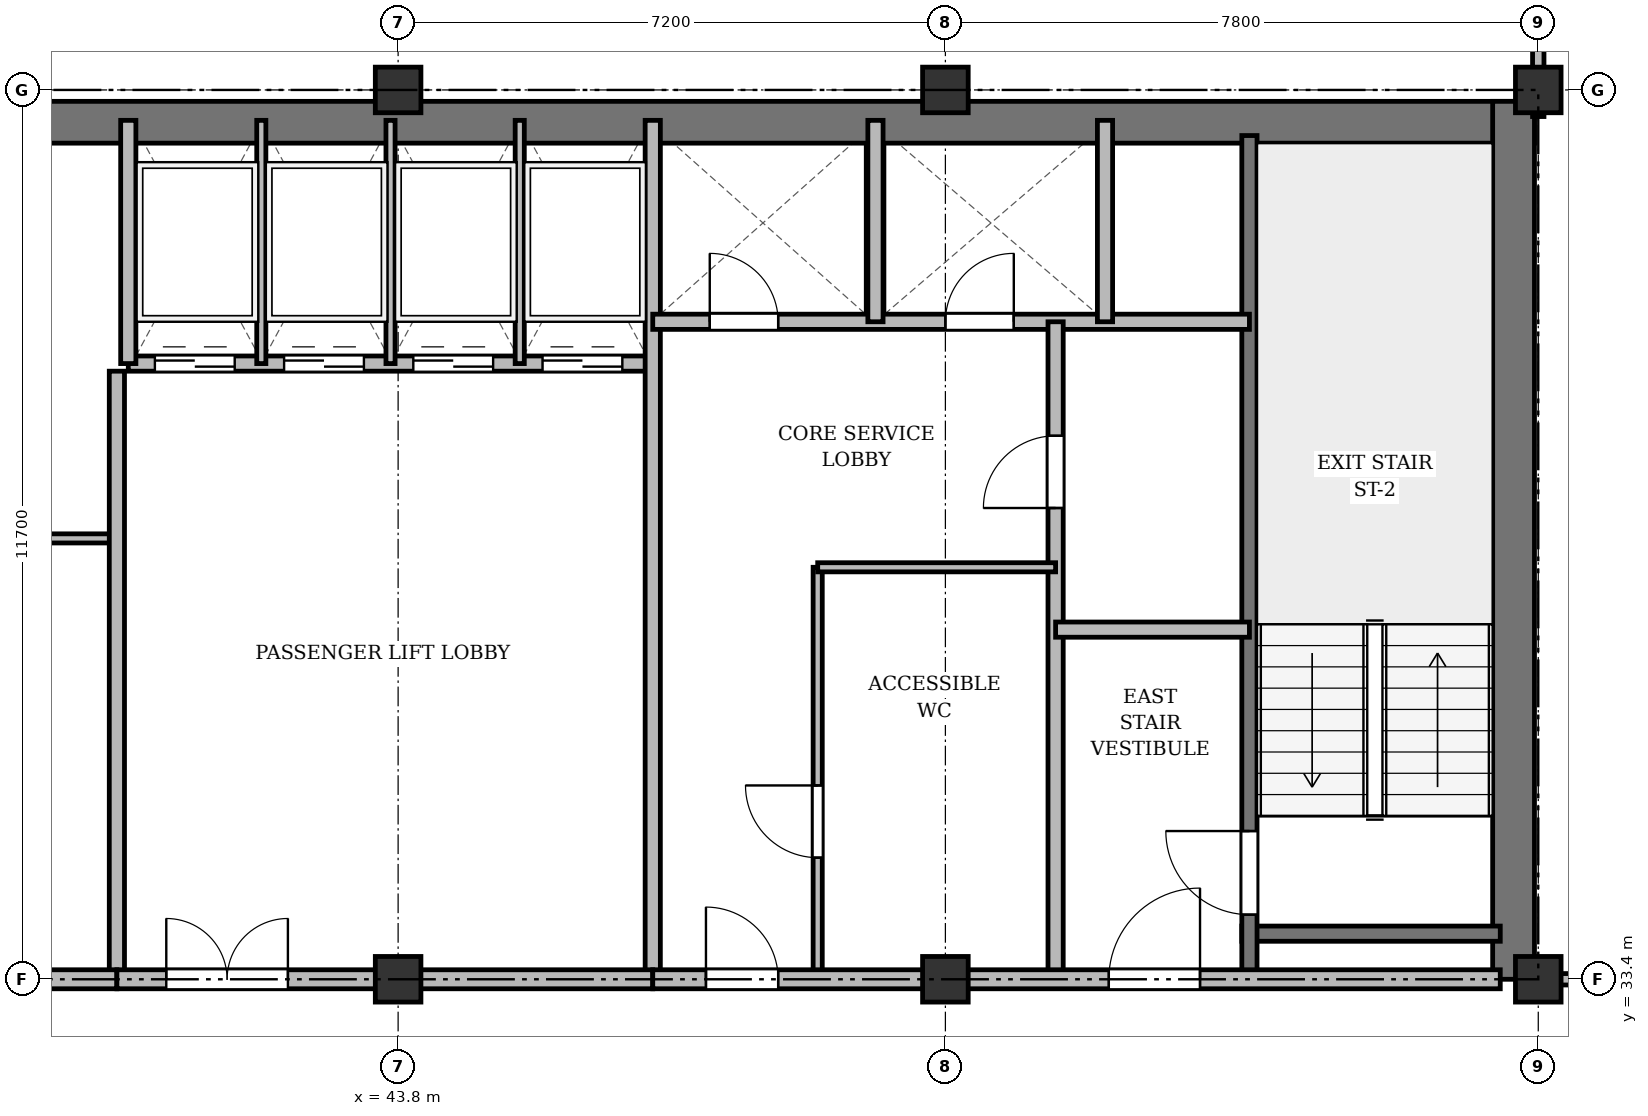
"""IFC4 building model, lengths in metres.
Left out: names, types, materials, properties, quantities, classifications, styles, units other than length and angle.
Written with IfcOpenShell. Run it as: python <this file> out.ifc"""

import sys

from ifc_helpers import new_model, si_unit, direction, frame, frame_2d, origin, origin_2d, place, context, subcontext, project, spatial, rectangle, extrude, source, transform, mapped, element, fill, save


model = new_model("IFC4")
c1 = context("Model", 3, precision=1e-05, world=origin(), true_north=direction((0.0, 1.0)))
c2 = subcontext(c1, "Body", "Model", "MODEL_VIEW")
j1 = project(units=[si_unit("LENGTHUNIT", "METRE"), si_unit("PLANEANGLEUNIT", "RADIAN")], contexts=[c1])
p1 = place(None, origin())
s1 = spatial("IfcSite", under=j1, at=p1, CompositionType="ELEMENT")
p2 = place(p1, origin())
s2 = spatial("IfcBuilding", under=s1, at=p2, CompositionType="ELEMENT")
p3 = place(p2, frame((0.0, 0.0, 252.3)))
s3 = spatial("IfcBuildingStorey", under=s2, at=p3, CompositionType="ELEMENT", Elevation=252.3)
m1 = source(origin(), c2, "Body", "SweptSolid", [
    extrude(rectangle(XDim=0.6, YDim=0.6, at=origin_2d()), origin(), (0.0, 0.0, 1.0), 3.6),
])
for number, where, z_axis, x_axis in (
    (1, (43.8, 33.4, 0.0), (0.0, 0.0, 1.0), (1.0, 0.0, 0.0)),
    (2, (43.8, 45.1, 0.0), (0.0, 0.0, 1.0), (1.0, 0.0, 0.0)),
    (3, (51.0, 33.4, 0.0), (0.0, 0.0, 1.0), (1.0, 0.0, 0.0)),
    (4, (51.0, 45.1, 0.0), (0.0, 0.0, 1.0), (1.0, 0.0, 0.0)),
    (5, (58.8, 33.4, 0.0), (0.0, 0.0, 1.0), (1.0, 0.0, 0.0)),
    (6, (58.8, 45.1, 0.0), (0.0, 0.0, 1.0), (1.0, 0.0, 0.0)),
):
    element("IfcColumn", number, at=place(p3, frame(where, z_axis=z_axis, x_axis=x_axis)), inside=s3, PredefinedType="COLUMN", context=c2, shape_type="MappedRepresentation", body=[
        mapped(m1, transform((0.0, 0.0, 0.0), x_axis=(1.0, 0.0, 0.0), y_axis=(0.0, 1.0, 0.0), z_axis=(0.0, 0.0, 1.0), scale=1.0)),
    ])
p4 = place(p3, frame((15.65, 44.675, 0.0), z_axis=(0.0, 0.0, 1.0), x_axis=(1.0, 0.0, 0.0)))
e7 = element("IfcWall", 7, at=p4, inside=s3, PredefinedType="SHEAR", context=c2, shape_type="SweptSolid", body=[
    extrude(rectangle(XDim=43.1, YDim=0.55, at=frame_2d((21.55, 0.0))), origin(), (0.0, 0.0, 1.0), 3.37),
])
p5 = place(p3, frame((58.475, 33.4, 0.0), z_axis=(0.0, 0.0, 1.0), x_axis=(0.0, 1.0, 0.0)))
e8 = element("IfcWall", 8, at=p5, inside=s3, PredefinedType="SHEAR", context=c2, shape_type="SweptSolid", body=[
    extrude(rectangle(XDim=11.55, YDim=0.55, at=frame_2d((5.775, 0.0))), origin(), (0.0, 0.0, 1.0), 3.37),
])
p6 = place(p3, frame((54.9, 34.0, 0.0), z_axis=(0.0, 0.0, 1.0), x_axis=(1.0, 0.0, 0.0)))
e9 = element("IfcWall", 9, at=p6, inside=s3, PredefinedType="SHEAR", context=c2, shape_type="SweptSolid", body=[
    extrude(rectangle(XDim=3.4, YDim=0.2, at=frame_2d((1.7, 0.0))), origin(), (0.0, 0.0, 1.0), 3.37),
])
p7 = place(p3, frame((55.0, 33.4, 0.0), z_axis=(0.0, 0.0, 1.0), x_axis=(0.0, 1.0, 0.0)))
e10 = element("IfcWall", 10, at=p7, inside=s3, PredefinedType="SHEAR", context=c2, shape_type="SweptSolid", body=[
    extrude(rectangle(XDim=11.1, YDim=0.2, at=frame_2d((5.55, 0.0))), origin(), (0.0, 0.0, 1.0), 3.37),
])
p8 = place(p7, frame((0.85, 0.0, 0.0)))
e11 = element("IfcOpeningElement", 11, at=p8, cuts=e10, PredefinedType="OPENING", context=c2, shape_type="SweptSolid", body=[
    extrude(rectangle(XDim=1.1, YDim=2.15, at=frame_2d((0.55, 1.075))), frame((0.0, 0.11, 0.0), z_axis=(0.0, -1.0, 0.0), x_axis=(1.0, 0.0, 0.0)), (0.0, 0.0, 1.0), 0.22),
])
p9 = place(p3, frame((33.3, 39.2, 0.0), z_axis=(0.0, 0.0, 1.0), x_axis=(1.0, 0.0, 0.0)))
e12 = element("IfcWall", 12, at=p9, inside=s3, PredefinedType="PARTITIONING", context=c2, shape_type="SweptSolid", body=[
    extrude(rectangle(XDim=6.8, YDim=0.12, at=frame_2d((3.4, 0.0))), origin(), (0.0, 0.0, 1.0), 3.37),
])
p10 = place(p9, frame((2.6, 0.0, 0.0)))
e13 = element("IfcOpeningElement", 13, at=p10, cuts=e12, PredefinedType="OPENING", context=c2, shape_type="SweptSolid", body=[
    extrude(rectangle(XDim=0.95, YDim=2.15, at=frame_2d((0.475, 1.075))), frame((0.0, 0.07, 0.0), z_axis=(0.0, -1.0, 0.0), x_axis=(1.0, 0.0, 0.0)), (0.0, 0.0, 1.0), 0.14),
])
p11 = place(p3, frame((40.1, 33.4, 0.0), z_axis=(0.0, 0.0, 1.0), x_axis=(0.0, 1.0, 0.0)))
e14 = element("IfcWall", 14, at=p11, inside=s3, PredefinedType="SOLIDWALL", context=c2, shape_type="SweptSolid", body=[
    extrude(rectangle(XDim=8.0, YDim=0.2, at=frame_2d((4.0, 0.0))), origin(), (0.0, 0.0, 1.0), 2.92),
])
p12 = place(p3, frame((40.25, 41.5, 0.0), z_axis=(0.0, 0.0, 1.0), x_axis=(1.0, 0.0, 0.0)))
e15 = element("IfcWall", 15, at=p12, inside=s3, PredefinedType="SOLIDWALL", context=c2, shape_type="SweptSolid", body=[
    extrude(rectangle(XDim=6.9, YDim=0.2, at=frame_2d((3.45, 0.0))), origin(), (0.0, 0.0, 1.0), 3.37),
])
p13 = place(p12, frame((0.35, 0.0, 0.0)))
e16 = element("IfcOpeningElement", 16, at=p13, cuts=e15, PredefinedType="OPENING", context=c2, shape_type="SweptSolid", body=[
    extrude(rectangle(XDim=1.05, YDim=2.15, at=frame_2d((0.525, 1.075))), frame((0.0, 0.11, 0.0), z_axis=(0.0, -1.0, 0.0), x_axis=(1.0, 0.0, 0.0)), (0.0, 0.0, 1.0), 0.22),
])
p14 = place(p12, frame((2.05, 0.0, 0.0)))
e17 = element("IfcOpeningElement", 17, at=p14, cuts=e15, PredefinedType="OPENING", context=c2, shape_type="SweptSolid", body=[
    extrude(rectangle(XDim=1.05, YDim=2.15, at=frame_2d((0.525, 1.075))), frame((0.0, 0.11, 0.0), z_axis=(0.0, -1.0, 0.0), x_axis=(1.0, 0.0, 0.0)), (0.0, 0.0, 1.0), 0.22),
])
p15 = place(p12, frame((3.75, 0.0, 0.0)))
e18 = element("IfcOpeningElement", 18, at=p15, cuts=e15, PredefinedType="OPENING", context=c2, shape_type="SweptSolid", body=[
    extrude(rectangle(XDim=1.05, YDim=2.15, at=frame_2d((0.525, 1.075))), frame((0.0, 0.11, 0.0), z_axis=(0.0, -1.0, 0.0), x_axis=(1.0, 0.0, 0.0)), (0.0, 0.0, 1.0), 0.22),
])
p16 = place(p12, frame((5.45, 0.0, 0.0)))
e19 = element("IfcOpeningElement", 19, at=p16, cuts=e15, PredefinedType="OPENING", context=c2, shape_type="SweptSolid", body=[
    extrude(rectangle(XDim=1.05, YDim=2.15, at=frame_2d((0.525, 1.075))), frame((0.0, 0.11, 0.0), z_axis=(0.0, -1.0, 0.0), x_axis=(1.0, 0.0, 0.0)), (0.0, 0.0, 1.0), 0.22),
])
p17 = place(p3, frame((40.25, 41.5, 0.0), z_axis=(0.0, 0.0, 1.0), x_axis=(0.0, 1.0, 0.0)))
e20 = element("IfcWall", 20, at=p17, inside=s3, PredefinedType="SOLIDWALL", context=c2, shape_type="SweptSolid", body=[
    extrude(rectangle(XDim=3.2, YDim=0.2, at=frame_2d((1.6, 0.0))), origin(), (0.0, 0.0, 1.0), 3.37),
])
for number, where, z_axis, x_axis in (
    (21, (42.0, 41.5, 0.0), (0.0, 0.0, 1.0), (0.0, 1.0, 0.0)),
    (22, (43.7, 41.5, 0.0), (0.0, 0.0, 1.0), (0.0, 1.0, 0.0)),
    (23, (45.4, 41.5, 0.0), (0.0, 0.0, 1.0), (0.0, 1.0, 0.0)),
):
    element("IfcWall", number, at=place(p3, frame(where, z_axis=z_axis, x_axis=x_axis)), inside=s3, PredefinedType="PARTITIONING", context=c2, shape_type="SweptSolid", body=[
        extrude(rectangle(XDim=3.2, YDim=0.12, at=frame_2d((1.6, 0.0))), origin(), (0.0, 0.0, 1.0), 3.37),
    ])
p18 = place(p3, frame((47.15, 33.4, 0.0), z_axis=(0.0, 0.0, 1.0), x_axis=(0.0, 1.0, 0.0)))
e24 = element("IfcWall", 24, at=p18, inside=s3, PredefinedType="SOLIDWALL", context=c2, shape_type="SweptSolid", body=[
    extrude(rectangle(XDim=11.3, YDim=0.2, at=frame_2d((5.65, 0.0))), origin(), (0.0, 0.0, 1.0), 2.92),
])
p19 = place(p3, frame((33.3, 33.4, 0.0), z_axis=(0.0, 0.0, 1.0), x_axis=(1.0, 0.0, 0.0)))
e25 = element("IfcWall", 25, at=p19, inside=s3, PredefinedType="PARTITIONING", context=c2, shape_type="SweptSolid", body=[
    extrude(rectangle(XDim=6.8, YDim=0.25, at=frame_2d((3.4, 0.0))), origin(), (0.0, 0.0, 1.0), 2.92),
])
p20 = place(p19, frame((2.4, 0.0, 0.0)))
e26 = element("IfcOpeningElement", 26, at=p20, cuts=e25, PredefinedType="OPENING", context=c2, shape_type="SweptSolid", body=[
    extrude(rectangle(XDim=1.0, YDim=2.15, at=frame_2d((0.5, 1.075))), frame((0.0, 0.135, 0.0), z_axis=(0.0, -1.0, 0.0), x_axis=(1.0, 0.0, 0.0)), (0.0, 0.0, 1.0), 0.27),
])
p21 = place(p3, frame((40.1, 33.4, 0.0), z_axis=(0.0, 0.0, 1.0), x_axis=(1.0, 0.0, 0.0)))
e27 = element("IfcWall", 27, at=p21, inside=s3, PredefinedType="PARTITIONING", context=c2, shape_type="SweptSolid", body=[
    extrude(rectangle(XDim=7.05, YDim=0.25, at=frame_2d((3.525, 0.0))), origin(), (0.0, 0.0, 1.0), 2.92),
])
p22 = place(p21, frame((0.65, 0.0, 0.0)))
e28 = element("IfcOpeningElement", 28, at=p22, cuts=e27, PredefinedType="OPENING", context=c2, shape_type="SweptSolid", body=[
    extrude(rectangle(XDim=1.6, YDim=2.2, at=frame_2d((0.8, 1.1))), frame((0.0, 0.135, 0.0), z_axis=(0.0, -1.0, 0.0), x_axis=(1.0, 0.0, 0.0)), (0.0, 0.0, 1.0), 0.27),
])
p23 = place(p3, frame((47.15, 42.05, 0.0), z_axis=(0.0, 0.0, 1.0), x_axis=(1.0, 0.0, 0.0)))
e29 = element("IfcWall", 29, at=p23, inside=s3, PredefinedType="SOLIDWALL", context=c2, shape_type="SweptSolid", body=[
    extrude(rectangle(XDim=7.85, YDim=0.2, at=frame_2d((3.925, 0.0))), origin(), (0.0, 0.0, 1.0), 2.87),
])
p24 = place(p23, frame((0.75, 0.0, 0.0)))
e30 = element("IfcOpeningElement", 30, at=p24, cuts=e29, PredefinedType="OPENING", context=c2, shape_type="SweptSolid", body=[
    extrude(rectangle(XDim=0.9, YDim=2.1, at=frame_2d((0.45, 1.05))), frame((0.0, 0.11, 0.0), z_axis=(0.0, -1.0, 0.0), x_axis=(1.0, 0.0, 0.0)), (0.0, 0.0, 1.0), 0.22),
])
p25 = place(p23, frame((3.85, 0.0, 0.0)))
e31 = element("IfcOpeningElement", 31, at=p25, cuts=e29, PredefinedType="OPENING", context=c2, shape_type="SweptSolid", body=[
    extrude(rectangle(XDim=0.9, YDim=2.1, at=frame_2d((0.45, 1.05))), frame((0.0, 0.11, 0.0), z_axis=(0.0, -1.0, 0.0), x_axis=(1.0, 0.0, 0.0)), (0.0, 0.0, 1.0), 0.22),
])
for number, where, z_axis, x_axis in (
    (32, (50.08, 42.05, 0.0), (0.0, 0.0, 1.0), (0.0, 1.0, 0.0)),
    (33, (53.1, 42.05, 0.0), (0.0, 0.0, 1.0), (0.0, 1.0, 0.0)),
):
    element("IfcWall", number, at=place(p3, frame(where, z_axis=z_axis, x_axis=x_axis)), inside=s3, PredefinedType="SOLIDWALL", context=c2, shape_type="SweptSolid", body=[
        extrude(rectangle(XDim=2.65, YDim=0.2, at=frame_2d((1.325, 0.0))), origin(), (0.0, 0.0, 1.0), 3.37),
    ])
p26 = place(p3, frame((52.45, 33.4, 0.0), z_axis=(0.0, 0.0, 1.0), x_axis=(0.0, 1.0, 0.0)))
e34 = element("IfcWall", 34, at=p26, inside=s3, PredefinedType="PARTITIONING", context=c2, shape_type="SweptSolid", body=[
    extrude(rectangle(XDim=8.65, YDim=0.2, at=frame_2d((4.325, 0.0))), origin(), (0.0, 0.0, 1.0), 2.92),
])
p27 = place(p26, frame((6.2, 0.0, 0.0)))
e35 = element("IfcOpeningElement", 35, at=p27, cuts=e34, PredefinedType="OPENING", context=c2, shape_type="SweptSolid", body=[
    extrude(rectangle(XDim=0.95, YDim=2.15, at=frame_2d((0.475, 1.075))), frame((0.0, 0.11, 0.0), z_axis=(0.0, -1.0, 0.0), x_axis=(1.0, 0.0, 0.0)), (0.0, 0.0, 1.0), 0.22),
])
p28 = place(p3, frame((52.45, 38.0, 0.0), z_axis=(0.0, 0.0, 1.0), x_axis=(1.0, 0.0, 0.0)))
e36 = element("IfcWall", 36, at=p28, inside=s3, PredefinedType="PARTITIONING", context=c2, shape_type="SweptSolid", body=[
    extrude(rectangle(XDim=2.55, YDim=0.2, at=frame_2d((1.275, 0.0))), origin(), (0.0, 0.0, 1.0), 3.37),
])
p29 = place(p3, frame((49.32, 33.4, 0.0), z_axis=(0.0, 0.0, 1.0), x_axis=(0.0, 1.0, 0.0)))
e37 = element("IfcWall", 37, at=p29, inside=s3, PredefinedType="PARTITIONING", context=c2, shape_type="SweptSolid", body=[
    extrude(rectangle(XDim=5.42, YDim=0.12, at=frame_2d((2.71, 0.0))), origin(), (0.0, 0.0, 1.0), 2.92),
])
p30 = place(p29, frame((1.6, 0.0, 0.0)))
e38 = element("IfcOpeningElement", 38, at=p30, cuts=e37, PredefinedType="OPENING", context=c2, shape_type="SweptSolid", body=[
    extrude(rectangle(XDim=0.95, YDim=2.15, at=frame_2d((0.475, 1.075))), frame((0.0, 0.07, 0.0), z_axis=(0.0, -1.0, 0.0), x_axis=(1.0, 0.0, 0.0)), (0.0, 0.0, 1.0), 0.14),
])
p31 = place(p3, frame((49.32, 38.82, 0.0), z_axis=(0.0, 0.0, 1.0), x_axis=(1.0, 0.0, 0.0)))
e39 = element("IfcWall", 39, at=p31, inside=s3, PredefinedType="PARTITIONING", context=c2, shape_type="SweptSolid", body=[
    extrude(rectangle(XDim=3.13, YDim=0.12, at=frame_2d((1.565, 0.0))), origin(), (0.0, 0.0, 1.0), 2.87),
])
p32 = place(p3, frame((47.15, 33.4, 0.0), z_axis=(0.0, 0.0, 1.0), x_axis=(1.0, 0.0, 0.0)))
e40 = element("IfcWall", 40, at=p32, inside=s3, PredefinedType="PARTITIONING", context=c2, shape_type="SweptSolid", body=[
    extrude(rectangle(XDim=11.15, YDim=0.25, at=frame_2d((5.575, 0.0))), origin(), (0.0, 0.0, 1.0), 2.92),
])
p33 = place(p32, frame((0.7, 0.0, 0.0)))
e41 = element("IfcOpeningElement", 41, at=p33, cuts=e40, PredefinedType="OPENING", context=c2, shape_type="SweptSolid", body=[
    extrude(rectangle(XDim=0.95, YDim=2.15, at=frame_2d((0.475, 1.075))), frame((0.0, 0.135, 0.0), z_axis=(0.0, -1.0, 0.0), x_axis=(1.0, 0.0, 0.0)), (0.0, 0.0, 1.0), 0.27),
])
p34 = place(p32, frame((6.0, 0.0, 0.0)))
e42 = element("IfcOpeningElement", 42, at=p34, cuts=e40, PredefinedType="OPENING", context=c2, shape_type="SweptSolid", body=[
    extrude(rectangle(XDim=1.2, YDim=2.15, at=frame_2d((0.6, 1.075))), frame((0.0, 0.135, 0.0), z_axis=(0.0, -1.0, 0.0), x_axis=(1.0, 0.0, 0.0)), (0.0, 0.0, 1.0), 0.27),
])
p35 = place(p3, frame((58.8, 33.4, 0.0), z_axis=(0.0, 0.0, 1.0), x_axis=(1.0, 0.0, 0.0)))
e43 = element("IfcWall", 43, at=p35, inside=s3, PredefinedType="PARTITIONING", context=c2, shape_type="SweptSolid", body=[
    extrude(rectangle(XDim=7.15, YDim=0.15, at=frame_2d((3.575, 0.0))), origin(), (0.0, 0.0, 1.0), 2.92),
])
p36 = place(p35, frame((3.0, 0.0, 0.0)))
e44 = element("IfcOpeningElement", 44, at=p36, cuts=e43, PredefinedType="OPENING", context=c2, shape_type="SweptSolid", body=[
    extrude(rectangle(XDim=0.95, YDim=2.15, at=frame_2d((0.475, 1.075))), frame((0.0, 0.085, 0.0), z_axis=(0.0, -1.0, 0.0), x_axis=(1.0, 0.0, 0.0)), (0.0, 0.0, 1.0), 0.17),
])
p37 = place(p3, frame((58.8, 44.75, 0.0), z_axis=(0.0, 0.0, 1.0), x_axis=(0.0, 1.0, 0.0)))
e45 = element("IfcWall", 45, at=p37, inside=s3, PredefinedType="PARTITIONING", context=c2, shape_type="SweptSolid", body=[
    extrude(rectangle(XDim=3.61, YDim=0.15, at=frame_2d((1.805, 0.0))), origin(), (0.0, 0.0, 1.0), 2.87),
])
p38 = place(p37, frame((1.1, 0.0, 0.0)))
e46 = element("IfcOpeningElement", 46, at=p38, cuts=e45, PredefinedType="OPENING", context=c2, shape_type="SweptSolid", body=[
    extrude(rectangle(XDim=0.95, YDim=2.15, at=frame_2d((0.475, 1.075))), frame((0.0, 0.085, 0.0), z_axis=(0.0, -1.0, 0.0), x_axis=(1.0, 0.0, 0.0)), (0.0, 0.0, 1.0), 0.17),
])
m2 = source(origin(), c2, "Body", "SweptSolid", [
    extrude(rectangle(XDim=1.1, YDim=2.15, at=frame_2d((0.55, 1.075))), frame((0.0, 0.025, 0.0), z_axis=(0.0, -1.0, 0.0), x_axis=(1.0, 0.0, 0.0)), (0.0, 0.0, 1.0), 0.05),
])
p39 = place(p8, origin())
e47 = element("IfcDoor", 47, at=p39, inside=s3, OperationType="SINGLE_SWING_RIGHT", PredefinedType="DOOR", context=c2, shape_type="MappedRepresentation", body=[
    mapped(m2, transform((0.0, 0.0, 0.0), x_axis=(1.0, 0.0, 0.0), y_axis=(0.0, 1.0, 0.0), z_axis=(0.0, 0.0, 1.0), scale=1.0)),
])
fill(e11, e47)
m3 = source(origin(), c2, "Body", "SweptSolid", [
    extrude(rectangle(XDim=1.05, YDim=2.15, at=frame_2d((0.525, 1.075))), frame((0.0, 0.025, 0.0), z_axis=(0.0, -1.0, 0.0), x_axis=(1.0, 0.0, 0.0)), (0.0, 0.0, 1.0), 0.05),
])
p40 = place(p13, origin())
e48 = element("IfcDoor", 48, at=p40, inside=s3, OperationType="DOUBLE_DOOR_SLIDING", PredefinedType="DOOR", context=c2, shape_type="MappedRepresentation", body=[
    mapped(m3, transform((0.0, 0.0, 0.0), x_axis=(1.0, 0.0, 0.0), y_axis=(0.0, 1.0, 0.0), z_axis=(0.0, 0.0, 1.0), scale=1.0)),
])
fill(e16, e48)
p41 = place(p14, origin())
e49 = element("IfcDoor", 49, at=p41, inside=s3, OperationType="DOUBLE_DOOR_SLIDING", PredefinedType="DOOR", context=c2, shape_type="MappedRepresentation", body=[
    mapped(m3, transform((0.0, 0.0, 0.0), x_axis=(1.0, 0.0, 0.0), y_axis=(0.0, 1.0, 0.0), z_axis=(0.0, 0.0, 1.0), scale=1.0)),
])
fill(e17, e49)
p42 = place(p15, origin())
e50 = element("IfcDoor", 50, at=p42, inside=s3, OperationType="DOUBLE_DOOR_SLIDING", PredefinedType="DOOR", context=c2, shape_type="MappedRepresentation", body=[
    mapped(m3, transform((0.0, 0.0, 0.0), x_axis=(1.0, 0.0, 0.0), y_axis=(0.0, 1.0, 0.0), z_axis=(0.0, 0.0, 1.0), scale=1.0)),
])
fill(e18, e50)
p43 = place(p16, origin())
e51 = element("IfcDoor", 51, at=p43, inside=s3, OperationType="DOUBLE_DOOR_SLIDING", PredefinedType="DOOR", context=c2, shape_type="MappedRepresentation", body=[
    mapped(m3, transform((0.0, 0.0, 0.0), x_axis=(1.0, 0.0, 0.0), y_axis=(0.0, 1.0, 0.0), z_axis=(0.0, 0.0, 1.0), scale=1.0)),
])
fill(e19, e51)
m4 = source(origin(), c2, "Body", "SweptSolid", [
    extrude(rectangle(XDim=1.6, YDim=2.2, at=frame_2d((0.8, 1.1))), frame((0.0, 0.025, 0.0), z_axis=(0.0, -1.0, 0.0), x_axis=(1.0, 0.0, 0.0)), (0.0, 0.0, 1.0), 0.05),
])
p44 = place(p22, origin())
e52 = element("IfcDoor", 52, at=p44, inside=s3, OperationType="DOUBLE_DOOR_SINGLE_SWING", PredefinedType="DOOR", context=c2, shape_type="MappedRepresentation", body=[
    mapped(m4, transform((0.0, 0.0, 0.0), x_axis=(1.0, 0.0, 0.0), y_axis=(0.0, 1.0, 0.0), z_axis=(0.0, 0.0, 1.0), scale=1.0)),
])
fill(e28, e52)
m5 = source(origin(), c2, "Body", "SweptSolid", [
    extrude(rectangle(XDim=0.9, YDim=2.1, at=frame_2d((0.45, 1.05))), frame((0.0, 0.025, 0.0), z_axis=(0.0, -1.0, 0.0), x_axis=(1.0, 0.0, 0.0)), (0.0, 0.0, 1.0), 0.05),
])
p45 = place(p24, origin())
e53 = element("IfcDoor", 53, at=p45, inside=s3, OperationType="SINGLE_SWING_LEFT", PredefinedType="DOOR", context=c2, shape_type="MappedRepresentation", body=[
    mapped(m5, transform((0.0, 0.0, 0.0), x_axis=(1.0, 0.0, 0.0), y_axis=(0.0, 1.0, 0.0), z_axis=(0.0, 0.0, 1.0), scale=1.0)),
])
fill(e30, e53)
p46 = place(p25, origin())
e54 = element("IfcDoor", 54, at=p46, inside=s3, OperationType="SINGLE_SWING_RIGHT", PredefinedType="DOOR", context=c2, shape_type="MappedRepresentation", body=[
    mapped(m5, transform((0.0, 0.0, 0.0), x_axis=(1.0, 0.0, 0.0), y_axis=(0.0, 1.0, 0.0), z_axis=(0.0, 0.0, 1.0), scale=1.0)),
])
fill(e31, e54)
m6 = source(origin(), c2, "Body", "SweptSolid", [
    extrude(rectangle(XDim=0.95, YDim=2.15, at=frame_2d((0.475, 1.075))), frame((0.0, 0.025, 0.0), z_axis=(0.0, -1.0, 0.0), x_axis=(1.0, 0.0, 0.0)), (0.0, 0.0, 1.0), 0.05),
])
p47 = place(p27, origin())
e55 = element("IfcDoor", 55, at=p47, inside=s3, OperationType="SINGLE_SWING_LEFT", PredefinedType="DOOR", context=c2, shape_type="MappedRepresentation", body=[
    mapped(m6, transform((0.0, 0.0, 0.0), x_axis=(1.0, 0.0, 0.0), y_axis=(0.0, 1.0, 0.0), z_axis=(0.0, 0.0, 1.0), scale=1.0)),
])
fill(e35, e55)
p48 = place(p30, origin())
e56 = element("IfcDoor", 56, at=p48, inside=s3, OperationType="SINGLE_SWING_RIGHT", PredefinedType="DOOR", context=c2, shape_type="MappedRepresentation", body=[
    mapped(m6, transform((0.0, 0.0, 0.0), x_axis=(1.0, 0.0, 0.0), y_axis=(0.0, 1.0, 0.0), z_axis=(0.0, 0.0, 1.0), scale=1.0)),
])
fill(e38, e56)
p49 = place(p33, origin())
e57 = element("IfcDoor", 57, at=p49, inside=s3, OperationType="SINGLE_SWING_LEFT", PredefinedType="DOOR", context=c2, shape_type="MappedRepresentation", body=[
    mapped(m6, transform((0.0, 0.0, 0.0), x_axis=(1.0, 0.0, 0.0), y_axis=(0.0, 1.0, 0.0), z_axis=(0.0, 0.0, 1.0), scale=1.0)),
])
fill(e41, e57)
m7 = source(origin(), c2, "Body", "SweptSolid", [
    extrude(rectangle(XDim=1.2, YDim=2.15, at=frame_2d((0.6, 1.075))), frame((0.0, 0.025, 0.0), z_axis=(0.0, -1.0, 0.0), x_axis=(1.0, 0.0, 0.0)), (0.0, 0.0, 1.0), 0.05),
])
p50 = place(p34, origin())
e58 = element("IfcDoor", 58, at=p50, inside=s3, OperationType="SINGLE_SWING_RIGHT", PredefinedType="DOOR", context=c2, shape_type="MappedRepresentation", body=[
    mapped(m7, transform((0.0, 0.0, 0.0), x_axis=(1.0, 0.0, 0.0), y_axis=(0.0, 1.0, 0.0), z_axis=(0.0, 0.0, 1.0), scale=1.0)),
])
fill(e42, e58)
save(model, sys.argv[1])
